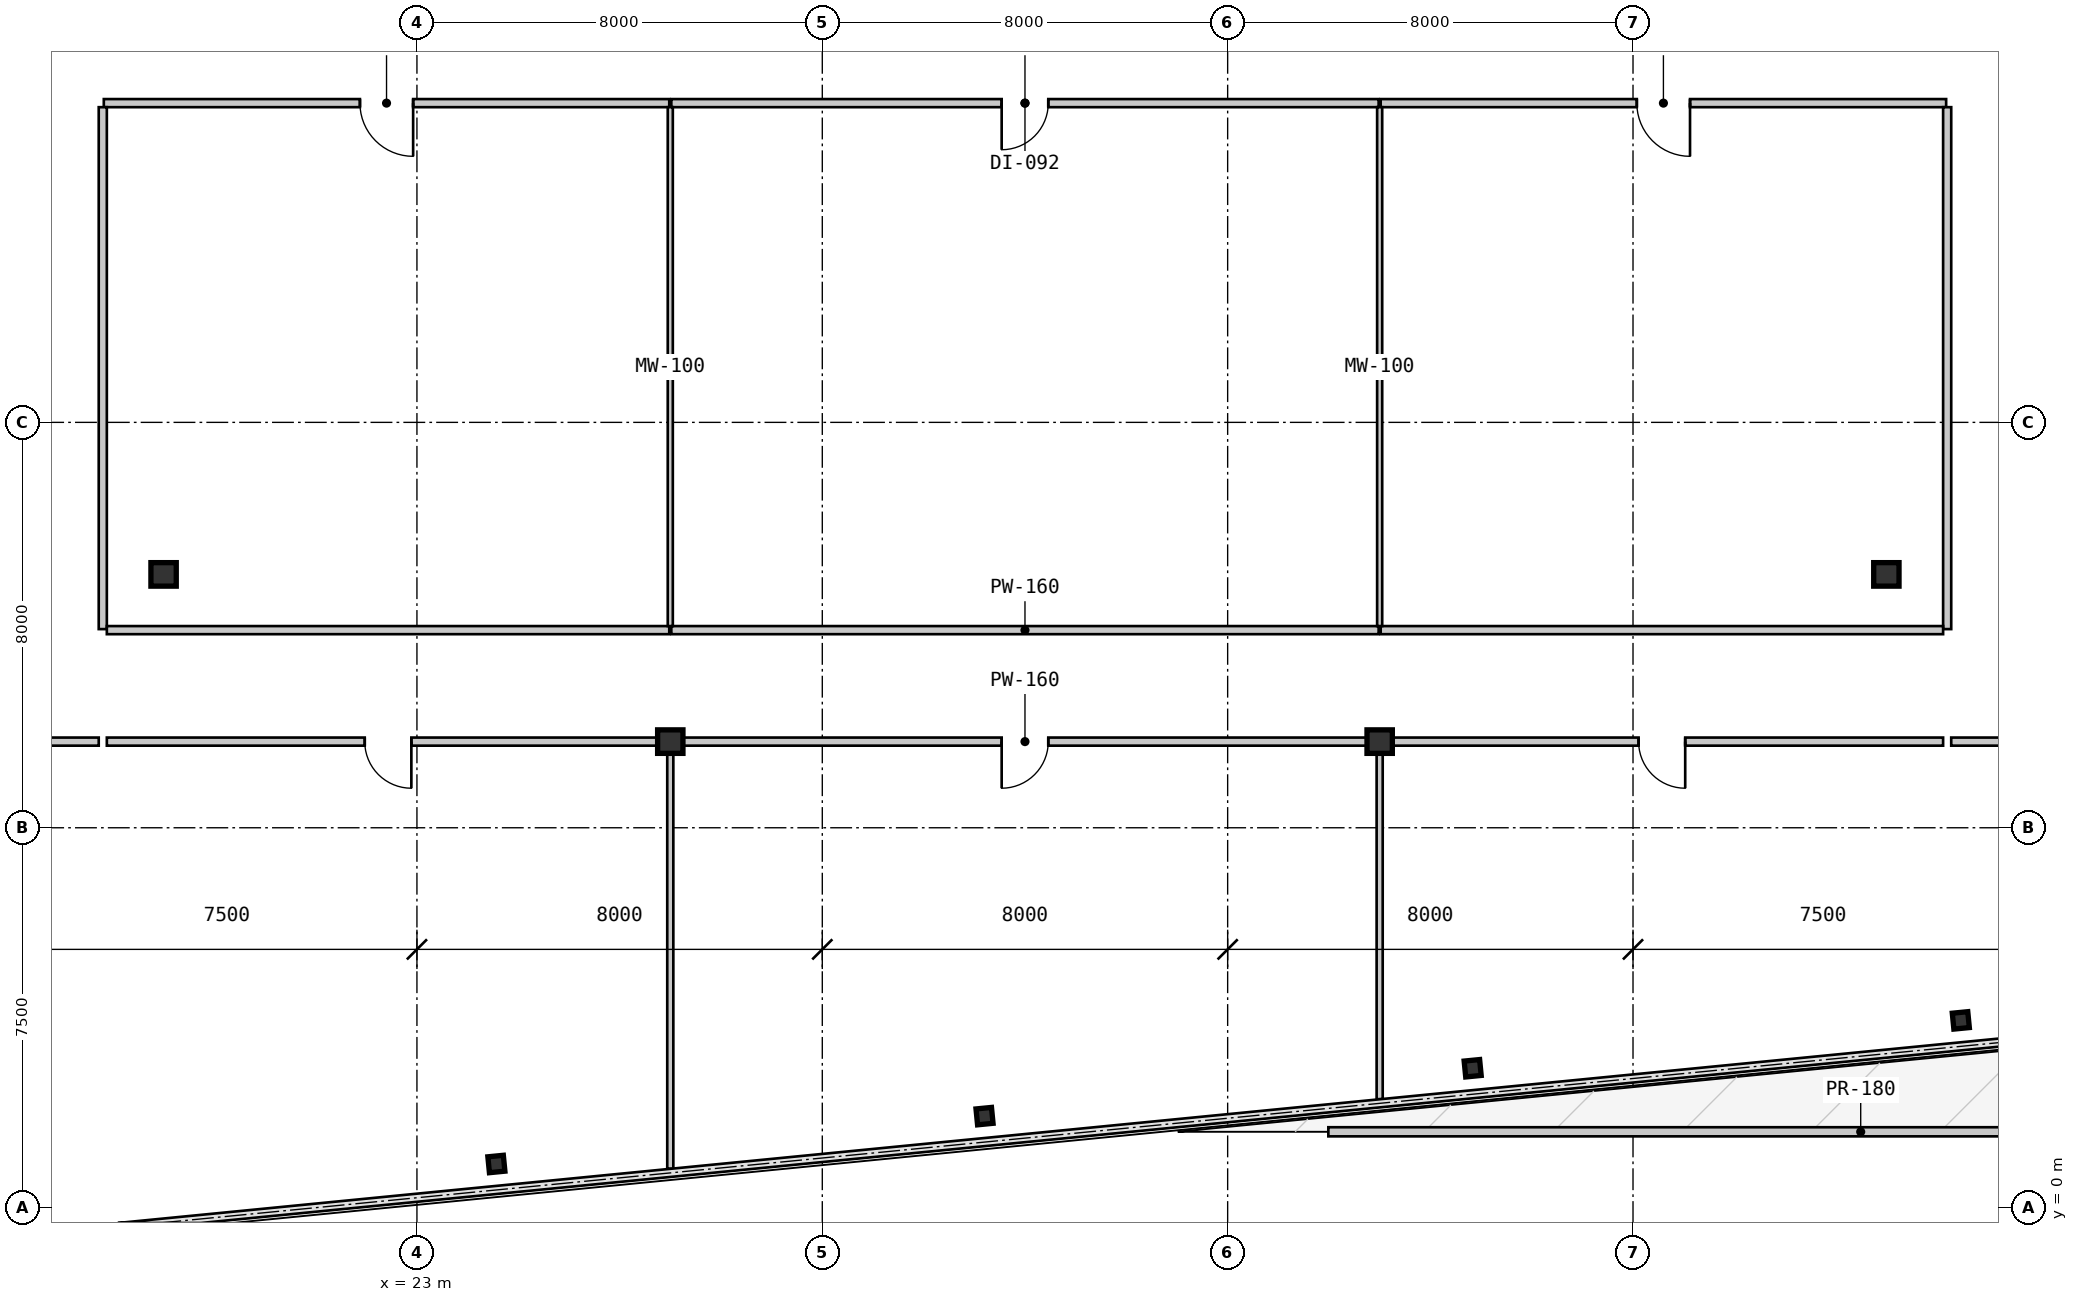
"""IFC4 building model, lengths in metres.
Left out: names, types, materials, properties, quantities, classifications, styles, units other than length and angle.
Written with IfcOpenShell. Run it as: python <this file> out.ifc"""

import sys

from ifc_helpers import new_model, si_unit, direction, frame, frame_2d, origin, origin_2d, place, context, subcontext, project, spatial, rectangle, i_section, extrude, source, transform, mapped, element, fill, save


model = new_model("IFC4")
c1 = context("Model", 3, precision=1e-05, world=origin(), true_north=direction((0.0, 1.0)))
c2 = subcontext(c1, "Body", "Model", "MODEL_VIEW")
j1 = project(units=[si_unit("LENGTHUNIT", "METRE"), si_unit("PLANEANGLEUNIT", "RADIAN")], contexts=[c1])
p1 = place(None, origin())
s1 = spatial("IfcSite", under=j1, at=p1, CompositionType="ELEMENT")
p2 = place(p1, origin())
s2 = spatial("IfcBuilding", under=s1, at=p2, CompositionType="ELEMENT")
p3 = place(p2, frame((0.0, 0.0, 65.1)))
s3 = spatial("IfcBuildingStorey", under=s2, at=p3, CompositionType="ELEMENT", Elevation=65.1)
m1 = source(origin(), c2, "Body", "SweptSolid", [
    extrude(i_section(OverallWidth=0.5, OverallDepth=0.464, WebThickness=0.022, FlangeThickness=0.034, at=origin_2d()), origin(), (0.0, 0.0, 1.0), 3.15),
])
for number, where, z_axis, x_axis in (
    (1, (28.0, 9.2, 0.0), (0.0, 0.0, 1.0), (1.0, 0.0, 0.0)),
    (2, (42.0, 9.2, 0.0), (0.0, 0.0, 1.0), (1.0, 0.0, 0.0)),
    (3, (18.0, 12.5, 0.0), (0.0, 0.0, 1.0), (1.0, 0.0, 0.0)),
    (4, (52.0, 12.5, 0.0), (0.0, 0.0, 1.0), (1.0, 0.0, 0.0)),
):
    element("IfcColumn", number, at=place(p3, frame(where, z_axis=z_axis, x_axis=x_axis)), inside=s3, PredefinedType="COLUMN", context=c2, shape_type="MappedRepresentation", body=[
        mapped(m1, transform((0.0, 0.0, 0.0), scale=1.0)),
    ])
m2 = source(origin(), c2, "Body", "SweptSolid", [
    extrude(i_section(OverallWidth=0.307, OverallDepth=0.315, WebThickness=0.012, FlangeThickness=0.019, at=origin_2d()), origin(), (0.0, 0.0, 1.0), 3.15),
])
for number, where, z_axis, x_axis in (
    (5, (24.568, 0.865, 0.0), (0.0, 0.0, 1.0), (0.995, 0.098, 0.0)),
    (6, (34.202, 1.809, 0.0), (0.0, 0.0, 1.0), (0.995, 0.098, 0.0)),
    (7, (43.835, 2.754, 0.0), (0.0, 0.0, 1.0), (0.995, 0.098, 0.0)),
    (8, (53.469, 3.698, 0.0), (0.0, 0.0, 1.0), (0.995, 0.098, 0.0)),
):
    element("IfcColumn", number, at=place(p3, frame(where, z_axis=z_axis, x_axis=x_axis)), inside=s3, PredefinedType="COLUMN", context=c2, shape_type="MappedRepresentation", body=[
        mapped(m2, transform((0.0, 0.0, 0.0), scale=1.0)),
    ])
m3 = source(origin(), c2, "Body", "SweptSolid", [
    extrude(rectangle(XDim=21.013, YDim=0.18, at=frame_2d((10.506, 0.0))), origin(), (0.0, 0.0, 1.0), 1.15),
])
p4 = place(p3, frame((62.0, 1.5, 0.0), z_axis=(0.0, 0.0, 1.0), x_axis=(-1.0, 0.0, 0.0)))
e9 = element("IfcWall", 9, at=p4, inside=s3, PredefinedType="PARAPET", context=c2, shape_type="MappedRepresentation", body=[
    mapped(m3, transform((0.0, 0.0, 0.0), scale=1.0)),
])
m4 = source(origin(), c2, "Body", "SweptSolid", [
    extrude(rectangle(XDim=11.159, YDim=0.16, at=frame_2d((5.58, 0.0))), origin(), (0.0, 0.0, 1.0), 2.93),
])
p5 = place(p3, frame((27.98, 21.8, 0.0), z_axis=(0.0, 0.0, 1.0), x_axis=(-1.0, 0.0, 0.0)))
e10 = element("IfcWall", 10, at=p5, inside=s3, PredefinedType="PARTITIONING", context=c2, shape_type="MappedRepresentation", body=[
    mapped(m4, transform((0.0, 0.0, 0.0), scale=1.0)),
])
m5 = source(origin(), c2, "Body", "SweptSolid", [
    extrude(rectangle(XDim=1.05, YDim=2.1, at=frame_2d((0.525, 1.05))), frame((0.0, 0.09, 0.0), z_axis=(0.0, -1.0, 0.0), x_axis=(1.0, 0.0, 0.0)), (0.0, 0.0, 1.0), 0.18),
])
p6 = place(p5, frame((5.055, 0.0, 0.0)))
e11 = element("IfcOpeningElement", 11, at=p6, cuts=e10, PredefinedType="OPENING", context=c2, shape_type="MappedRepresentation", body=[
    mapped(m5, transform((0.0, 0.0, 0.0), scale=1.0)),
])
m6 = source(origin(), c2, "Body", "SweptSolid", [
    extrude(rectangle(XDim=10.3, YDim=0.16, at=frame_2d((5.15, 0.0))), origin(), (0.0, 0.0, 1.0), 2.93),
])
p7 = place(p3, frame((16.8, 21.72, 0.0), z_axis=(0.0, 0.0, 1.0), x_axis=(0.0, -1.0, 0.0)))
e12 = element("IfcWall", 12, at=p7, inside=s3, PredefinedType="PARTITIONING", context=c2, shape_type="MappedRepresentation", body=[
    mapped(m6, transform((0.0, 0.0, 0.0), scale=1.0)),
])
m7 = source(origin(), c2, "Body", "SweptSolid", [
    extrude(rectangle(XDim=13.959, YDim=0.16, at=frame_2d((6.98, 0.0))), origin(), (0.0, 0.0, 1.0), 2.93),
])
p8 = place(p3, frame((41.98, 21.8, 0.0), z_axis=(0.0, 0.0, 1.0), x_axis=(-1.0, 0.0, 0.0)))
e13 = element("IfcWall", 13, at=p8, inside=s3, PredefinedType="PARTITIONING", context=c2, shape_type="MappedRepresentation", body=[
    mapped(m7, transform((0.0, 0.0, 0.0), scale=1.0)),
])
m8 = source(origin(), c2, "Body", "SweptSolid", [
    extrude(rectangle(XDim=0.92, YDim=2.1, at=frame_2d((0.46, 1.05))), frame((0.0, 0.09, 0.0), z_axis=(0.0, -1.0, 0.0), x_axis=(1.0, 0.0, 0.0)), (0.0, 0.0, 1.0), 0.18),
])
p9 = place(p8, frame((6.52, 0.0, 0.0)))
e14 = element("IfcOpeningElement", 14, at=p9, cuts=e13, PredefinedType="OPENING", context=c2, shape_type="MappedRepresentation", body=[
    mapped(m8, transform((0.0, 0.0, 0.0), scale=1.0)),
])
p10 = place(p3, frame((53.18, 21.8, 0.0), z_axis=(0.0, 0.0, 1.0), x_axis=(-1.0, 0.0, 0.0)))
e15 = element("IfcWall", 15, at=p10, inside=s3, PredefinedType="PARTITIONING", context=c2, shape_type="MappedRepresentation", body=[
    mapped(m4, transform((0.0, 0.0, 0.0), scale=1.0)),
])
p11 = place(p10, frame((5.055, 0.0, 0.0)))
e16 = element("IfcOpeningElement", 16, at=p11, cuts=e15, PredefinedType="OPENING", context=c2, shape_type="MappedRepresentation", body=[
    mapped(m5, transform((0.0, 0.0, 0.0), scale=1.0)),
])
p12 = place(p3, frame((53.2, 11.42, 0.0), z_axis=(0.0, 0.0, 1.0), x_axis=(0.0, 1.0, 0.0)))
e17 = element("IfcWall", 17, at=p12, inside=s3, PredefinedType="PARTITIONING", context=c2, shape_type="MappedRepresentation", body=[
    mapped(m6, transform((0.0, 0.0, 0.0), scale=1.0)),
])
m9 = source(origin(), c2, "Body", "SweptSolid", [
    extrude(rectangle(XDim=2.04, YDim=0.16, at=frame_2d((1.02, 0.0))), origin(), (0.0, 0.0, 1.0), 2.93),
])
for number, where, z_axis, x_axis in (
    (18, (16.72, 9.2, 0.0), (0.0, 0.0, 1.0), (-1.0, 0.0, 0.0)),
    (19, (55.32, 9.2, 0.0), (0.0, 0.0, 1.0), (-1.0, 0.0, 0.0)),
):
    element("IfcWall", number, at=place(p3, frame(where, z_axis=z_axis, x_axis=x_axis)), inside=s3, PredefinedType="PARTITIONING", context=c2, shape_type="MappedRepresentation", body=[
        mapped(m9, transform((0.0, 0.0, 0.0), scale=1.0)),
    ])
m10 = source(origin(), c2, "Body", "SweptSolid", [
    extrude(rectangle(XDim=11.1, YDim=0.16, at=frame_2d((5.55, 0.0))), origin(), (0.0, 0.0, 1.0), 2.93),
])
p13 = place(p3, frame((16.88, 11.4, 0.0), z_axis=(0.0, 0.0, 1.0), x_axis=(1.0, 0.0, 0.0)))
e20 = element("IfcWall", 20, at=p13, inside=s3, PredefinedType="PARTITIONING", context=c2, shape_type="MappedRepresentation", body=[
    mapped(m10, transform((0.0, 0.0, 0.0), scale=1.0)),
])
p14 = place(p3, frame((28.02, 11.4, 0.0), z_axis=(0.0, 0.0, 1.0), x_axis=(1.0, 0.0, 0.0)))
e21 = element("IfcWall", 21, at=p14, inside=s3, PredefinedType="PARTITIONING", context=c2, shape_type="MappedRepresentation", body=[
    mapped(m7, transform((0.0, 0.0, 0.0), scale=1.0)),
])
p15 = place(p3, frame((42.02, 11.4, 0.0), z_axis=(0.0, 0.0, 1.0), x_axis=(1.0, 0.0, 0.0)))
e22 = element("IfcWall", 22, at=p15, inside=s3, PredefinedType="PARTITIONING", context=c2, shape_type="MappedRepresentation", body=[
    mapped(m10, transform((0.0, 0.0, 0.0), scale=1.0)),
])
p16 = place(p3, frame((27.98, 9.2, 0.0), z_axis=(0.0, 0.0, 1.0), x_axis=(-1.0, 0.0, 0.0)))
e23 = element("IfcWall", 23, at=p16, inside=s3, PredefinedType="PARTITIONING", context=c2, shape_type="MappedRepresentation", body=[
    mapped(m10, transform((0.0, 0.0, 0.0), scale=1.0)),
])
p17 = place(p16, frame((5.09, 0.0, 0.0)))
e24 = element("IfcOpeningElement", 24, at=p17, cuts=e23, PredefinedType="OPENING", context=c2, shape_type="MappedRepresentation", body=[
    mapped(m8, transform((0.0, 0.0, 0.0), scale=1.0)),
])
m11 = source(origin(), c2, "Body", "SweptSolid", [
    extrude(rectangle(XDim=13.959, YDim=0.16, at=frame_2d((6.98, 0.0))), origin(), (0.0, 0.0, 1.0), 2.328),
])
p18 = place(p3, frame((41.98, 9.2, 0.0), z_axis=(0.0, 0.0, 1.0), x_axis=(-1.0, 0.0, 0.0)))
e25 = element("IfcWall", 25, at=p18, inside=s3, PredefinedType="PARTITIONING", context=c2, shape_type="MappedRepresentation", body=[
    mapped(m11, transform((0.0, 0.0, 0.0), scale=1.0)),
])
p19 = place(p18, frame((6.52, 0.0, 0.0)))
e26 = element("IfcOpeningElement", 26, at=p19, cuts=e25, PredefinedType="OPENING", context=c2, shape_type="MappedRepresentation", body=[
    mapped(m8, transform((0.0, 0.0, 0.0), scale=1.0)),
])
p20 = place(p3, frame((53.12, 9.2, 0.0), z_axis=(0.0, 0.0, 1.0), x_axis=(-1.0, 0.0, 0.0)))
e27 = element("IfcWall", 27, at=p20, inside=s3, PredefinedType="PARTITIONING", context=c2, shape_type="MappedRepresentation", body=[
    mapped(m10, transform((0.0, 0.0, 0.0), scale=1.0)),
])
p21 = place(p20, frame((5.09, 0.0, 0.0)))
e28 = element("IfcOpeningElement", 28, at=p21, cuts=e27, PredefinedType="OPENING", context=c2, shape_type="MappedRepresentation", body=[
    mapped(m8, transform((0.0, 0.0, 0.0), scale=1.0)),
])
m12 = source(origin(), c2, "Body", "SweptSolid", [
    extrude(rectangle(XDim=10.24, YDim=0.1, at=frame_2d((5.12, 0.0))), origin(), (0.0, 0.0, 1.0), 2.328),
])
p22 = place(p3, frame((28.0, 21.72, 0.0), z_axis=(0.0, 0.0, 1.0), x_axis=(0.0, -1.0, 0.0)))
e29 = element("IfcWall", 29, at=p22, inside=s3, PredefinedType="MOVABLE", context=c2, shape_type="MappedRepresentation", body=[
    mapped(m12, transform((0.0, 0.0, 0.0), scale=1.0)),
])
m13 = source(origin(), c2, "Body", "SweptSolid", [
    extrude(rectangle(XDim=10.24, YDim=0.1, at=frame_2d((5.12, 0.0))), origin(), (0.0, 0.0, 1.0), 2.93),
])
p23 = place(p3, frame((42.0, 21.72, 0.0), z_axis=(0.0, 0.0, 1.0), x_axis=(0.0, -1.0, 0.0)))
e30 = element("IfcWall", 30, at=p23, inside=s3, PredefinedType="MOVABLE", context=c2, shape_type="MappedRepresentation", body=[
    mapped(m13, transform((0.0, 0.0, 0.0), scale=1.0)),
])
m14 = source(origin(), c2, "Body", "SweptSolid", [
    extrude(rectangle(XDim=8.349, YDim=0.12, at=frame_2d((4.174, 0.0))), origin(), (0.0, 0.0, 1.0), 2.93),
])
p24 = place(p3, frame((28.0, 9.12, 0.0), z_axis=(0.0, 0.0, 1.0), x_axis=(0.0, -1.0, 0.0)))
e31 = element("IfcWall", 31, at=p24, inside=s3, PredefinedType="PARTITIONING", context=c2, shape_type="MappedRepresentation", body=[
    mapped(m14, transform((0.0, 0.0, 0.0), scale=1.0)),
])
m15 = source(origin(), c2, "Body", "SweptSolid", [
    extrude(rectangle(XDim=6.976, YDim=0.12, at=frame_2d((3.488, 0.0))), origin(), (0.0, 0.0, 1.0), 2.93),
])
p25 = place(p3, frame((42.0, 9.12, 0.0), z_axis=(0.0, 0.0, 1.0), x_axis=(0.0, -1.0, 0.0)))
e32 = element("IfcWall", 32, at=p25, inside=s3, PredefinedType="PARTITIONING", context=c2, shape_type="MappedRepresentation", body=[
    mapped(m15, transform((0.0, 0.0, 0.0), scale=1.0)),
])
m16 = source(origin(), c2, "Body", "SweptSolid", [
    extrude(rectangle(XDim=1.05, YDim=2.1, at=frame_2d((0.525, 1.05))), frame((0.0, 0.025, 0.0), z_axis=(0.0, -1.0, 0.0), x_axis=(1.0, 0.0, 0.0)), (0.0, 0.0, 1.0), 0.05),
])
p26 = place(p6, origin())
e33 = element("IfcDoor", 33, at=p26, inside=s3, OperationType="SINGLE_SWING_LEFT", PredefinedType="DOOR", context=c2, shape_type="MappedRepresentation", body=[
    mapped(m16, transform((0.0, 0.0, 0.0), scale=1.0)),
])
fill(e11, e33)
m17 = source(origin(), c2, "Body", "SweptSolid", [
    extrude(rectangle(XDim=0.92, YDim=2.1, at=frame_2d((0.46, 1.05))), frame((0.0, 0.025, 0.0), z_axis=(0.0, -1.0, 0.0), x_axis=(1.0, 0.0, 0.0)), (0.0, 0.0, 1.0), 0.05),
])
p27 = place(p9, origin())
e34 = element("IfcDoor", 34, at=p27, inside=s3, OperationType="SINGLE_SWING_RIGHT", PredefinedType="DOOR", context=c2, shape_type="MappedRepresentation", body=[
    mapped(m17, transform((0.0, 0.0, 0.0), scale=1.0)),
])
fill(e14, e34)
p28 = place(p11, origin())
e35 = element("IfcDoor", 35, at=p28, inside=s3, OperationType="SINGLE_SWING_LEFT", PredefinedType="DOOR", context=c2, shape_type="MappedRepresentation", body=[
    mapped(m16, transform((0.0, 0.0, 0.0), scale=1.0)),
])
fill(e16, e35)
p29 = place(p17, origin())
e36 = element("IfcDoor", 36, at=p29, inside=s3, OperationType="SINGLE_SWING_LEFT", PredefinedType="DOOR", context=c2, shape_type="MappedRepresentation", body=[
    mapped(m17, transform((0.0, 0.0, 0.0), scale=1.0)),
])
fill(e24, e36)
p30 = place(p19, origin())
e37 = element("IfcDoor", 37, at=p30, inside=s3, OperationType="SINGLE_SWING_RIGHT", PredefinedType="DOOR", context=c2, shape_type="MappedRepresentation", body=[
    mapped(m17, transform((0.0, 0.0, 0.0), scale=1.0)),
])
fill(e26, e37)
p31 = place(p21, origin())
e38 = element("IfcDoor", 38, at=p31, inside=s3, OperationType="SINGLE_SWING_LEFT", PredefinedType="DOOR", context=c2, shape_type="MappedRepresentation", body=[
    mapped(m17, transform((0.0, 0.0, 0.0), scale=1.0)),
])
fill(e28, e38)
save(model, sys.argv[1])
